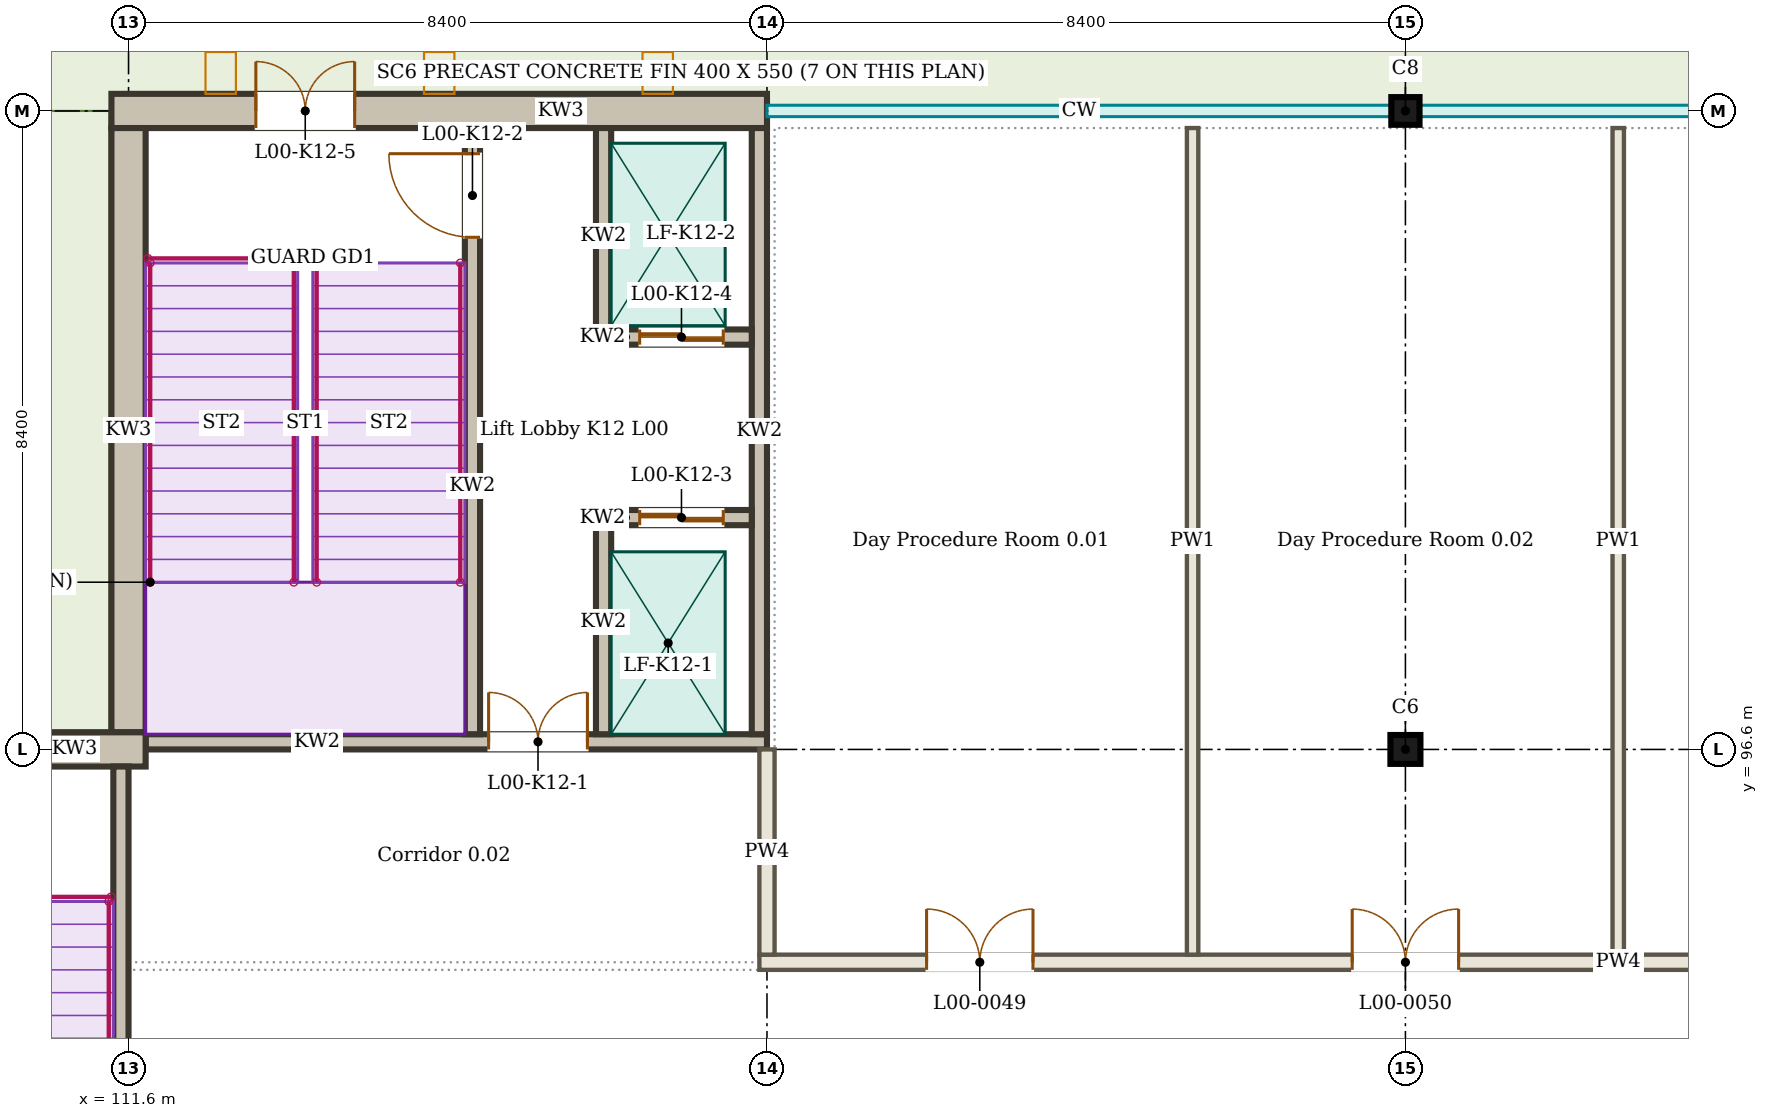
"""IFC4 building model, lengths in metres.
Left out: names, types, materials, properties, quantities, classifications, styles, units other than length and angle.
Written with IfcOpenShell. Run it as: python <this file> out.ifc"""

import sys

from ifc_helpers import new_model, si_unit, direction, frame, frame_2d, origin, origin_2d, place, context, subcontext, project, spatial, rectangle, i_section, extrude, element, fill, save


model = new_model("IFC4")
c1 = context("Model", 3, precision=1e-05, world=origin(), true_north=direction((0.0, 1.0)))
c2 = subcontext(c1, "Body", "Model", "MODEL_VIEW")
j1 = project(units=[si_unit("LENGTHUNIT", "METRE"), si_unit("PLANEANGLEUNIT", "RADIAN")], contexts=[c1])
p1 = place(None, origin())
s1 = spatial("IfcSite", under=j1, at=p1, CompositionType="ELEMENT")
p2 = place(p1, origin())
s2 = spatial("IfcBuilding", under=s1, at=p2, CompositionType="ELEMENT")
p3 = place(p2, origin())
s3 = spatial("IfcBuildingStorey", under=s2, at=p3, CompositionType="ELEMENT", Elevation=0.0)
p4 = place(p3, frame((128.4, 96.6, 0.0), z_axis=(0.0, 0.0, 1.0), x_axis=(1.0, 0.0, 0.0)))
e1 = element("IfcColumn", 1, at=p4, inside=s3, PredefinedType="COLUMN", context=c2, shape_type="SweptSolid", body=[
    extrude(i_section(OverallWidth=0.395, OverallDepth=0.38, WebThickness=0.019, FlangeThickness=0.03, FilletRadius=0.027, at=origin_2d()), origin(), (0.0, 0.0, 1.0), 4.5),
])
p5 = place(p3, frame((128.4, 105.0, 0.0), z_axis=(0.0, 0.0, 1.0), x_axis=(1.0, 0.0, 0.0)))
e2 = element("IfcColumn", 2, at=p5, inside=s3, PredefinedType="COLUMN", context=c2, shape_type="SweptSolid", body=[
    extrude(i_section(OverallWidth=0.371, OverallDepth=0.364, WebThickness=0.013, FlangeThickness=0.022, FilletRadius=0.027, at=origin_2d()), origin(), (0.0, 0.0, 1.0), 4.5),
])
p6 = place(p3, frame((119.9, 93.8, 0.0), z_axis=(0.0, 0.0, 1.0), x_axis=(1.0, 0.0, 0.0)))
e3 = element("IfcWall", 3, at=p6, inside=s3, PredefinedType="PARTITIONING", context=c2, shape_type="SweptSolid", body=[
    extrude(rectangle(XDim=22.6, YDim=0.2, at=frame_2d((11.3, 0.0))), origin(), (0.0, 0.0, 1.0), 3.8),
])
p7 = place(p6, frame((2.2, 0.0, 0.0)))
e4 = element("IfcOpeningElement", 4, at=p7, cuts=e3, PredefinedType="OPENING", context=c2, shape_type="SweptSolid", body=[
    extrude(rectangle(XDim=1.4, YDim=2.1, at=frame_2d((0.7, 1.05))), frame((0.0, 0.11, 0.0), z_axis=(0.0, -1.0, 0.0), x_axis=(1.0, 0.0, 0.0)), (0.0, 0.0, 1.0), 0.22),
])
p8 = place(p6, frame((7.8, 0.0, 0.0)))
e5 = element("IfcOpeningElement", 5, at=p8, cuts=e3, PredefinedType="OPENING", context=c2, shape_type="SweptSolid", body=[
    extrude(rectangle(XDim=1.4, YDim=2.1, at=frame_2d((0.7, 1.05))), frame((0.0, 0.11, 0.0), z_axis=(0.0, -1.0, 0.0), x_axis=(1.0, 0.0, 0.0)), (0.0, 0.0, 1.0), 0.22),
])
p9 = place(p6, frame((13.4, 0.0, 0.0)))
e6 = element("IfcOpeningElement", 6, at=p9, cuts=e3, PredefinedType="OPENING", context=c2, shape_type="SweptSolid", body=[
    extrude(rectangle(XDim=1.4, YDim=2.1, at=frame_2d((0.7, 1.05))), frame((0.0, 0.11, 0.0), z_axis=(0.0, -1.0, 0.0), x_axis=(1.0, 0.0, 0.0)), (0.0, 0.0, 1.0), 0.22),
])
p10 = place(p6, frame((19.0, 0.0, 0.0)))
e7 = element("IfcOpeningElement", 7, at=p10, cuts=e3, PredefinedType="OPENING", context=c2, shape_type="SweptSolid", body=[
    extrude(rectangle(XDim=1.4, YDim=2.1, at=frame_2d((0.7, 1.05))), frame((0.0, 0.11, 0.0), z_axis=(0.0, -1.0, 0.0), x_axis=(1.0, 0.0, 0.0)), (0.0, 0.0, 1.0), 0.22),
])
p11 = place(p3, frame((120.0, 93.9, 0.0), z_axis=(0.0, 0.0, 1.0), x_axis=(0.0, 1.0, 0.0)))
e8 = element("IfcWall", 8, at=p11, inside=s3, PredefinedType="PARTITIONING", context=c2, shape_type="SweptSolid", body=[
    extrude(rectangle(XDim=2.7, YDim=0.2, at=frame_2d((1.35, 0.0))), origin(), (0.0, 0.0, 1.0), 3.8),
])
for number, where, z_axis, x_axis in (
    (9, (125.6, 93.9, 0.0), (0.0, 0.0, 1.0), (0.0, 1.0, 0.0)),
    (10, (131.2, 93.9, 0.0), (0.0, 0.0, 1.0), (0.0, 1.0, 0.0)),
):
    element("IfcWall", number, at=place(p3, frame(where, z_axis=z_axis, x_axis=x_axis)), inside=s3, PredefinedType="PARTITIONING", context=c2, shape_type="SweptSolid", body=[
        extrude(rectangle(XDim=10.875, YDim=0.15, at=frame_2d((5.438, 0.0))), origin(), (0.0, 0.0, 1.0), 3.8),
    ])
p12 = place(p3, frame((111.825, 96.6, 0.0), z_axis=(0.0, 0.0, 1.0), x_axis=(-1.0, 0.0, 0.0)))
e11 = element("IfcWall", 11, at=p12, inside=s3, PredefinedType="SOLIDWALL", context=c2, shape_type="SweptSolid", body=[
    extrude(rectangle(XDim=8.625, YDim=0.45, at=frame_2d((4.312, 0.0))), origin(), (0.0, 0.0, 1.0), 4.5),
])
p13 = place(p12, frame((1.875, 0.0, 0.0)))
e12 = element("IfcOpeningElement", 12, at=p13, cuts=e11, PredefinedType="OPENING", context=c2, shape_type="SweptSolid", body=[
    extrude(rectangle(XDim=1.3, YDim=2.1, at=frame_2d((0.65, 1.05))), frame((0.0, 0.235, 0.0), z_axis=(0.0, -1.0, 0.0), x_axis=(1.0, 0.0, 0.0)), (0.0, 0.0, 1.0), 0.47),
])
p14 = place(p3, frame((111.5, 88.4, 0.0), z_axis=(0.0, 0.0, 1.0), x_axis=(0.0, 1.0, 0.0)))
e13 = element("IfcWall", 13, at=p14, inside=s3, PredefinedType="SOLIDWALL", context=c2, shape_type="SweptSolid", body=[
    extrude(rectangle(XDim=7.975, YDim=0.2, at=frame_2d((3.988, 0.0))), origin(), (0.0, 0.0, 1.0), 4.5),
])
p15 = place(p3, frame((111.825, 96.7, 0.0), z_axis=(0.0, 0.0, 1.0), x_axis=(1.0, 0.0, 0.0)))
e14 = element("IfcWall", 14, at=p15, inside=s3, PredefinedType="SOLIDWALL", context=c2, shape_type="SweptSolid", body=[
    extrude(rectangle(XDim=8.175, YDim=0.2, at=frame_2d((4.087, 0.0))), origin(), (0.0, 0.0, 1.0), 4.5),
])
p16 = place(p15, frame((4.512, 0.0, 0.0)))
e15 = element("IfcOpeningElement", 15, at=p16, cuts=e14, PredefinedType="OPENING", context=c2, shape_type="SweptSolid", body=[
    extrude(rectangle(XDim=1.3, YDim=2.1, at=frame_2d((0.65, 1.05))), frame((0.0, 0.11, 0.0), z_axis=(0.0, -1.0, 0.0), x_axis=(1.0, 0.0, 0.0)), (0.0, 0.0, 1.0), 0.22),
])
p17 = place(p3, frame((111.375, 105.0, 0.0), z_axis=(0.0, 0.0, 1.0), x_axis=(1.0, 0.0, 0.0)))
e16 = element("IfcWall", 16, at=p17, inside=s3, PredefinedType="SOLIDWALL", context=c2, shape_type="SweptSolid", body=[
    extrude(rectangle(XDim=8.625, YDim=0.45, at=frame_2d((4.312, 0.0))), origin(), (0.0, 0.0, 1.0), 4.5),
])
p18 = place(p17, frame((1.9, 0.0, 0.0)))
e17 = element("IfcOpeningElement", 17, at=p18, cuts=e16, PredefinedType="OPENING", context=c2, shape_type="SweptSolid", body=[
    extrude(rectangle(XDim=1.3, YDim=2.1, at=frame_2d((0.65, 1.05))), frame((0.0, 0.235, 0.0), z_axis=(0.0, -1.0, 0.0), x_axis=(1.0, 0.0, 0.0)), (0.0, 0.0, 1.0), 0.47),
])
p19 = place(p3, frame((111.6, 96.825, 0.0), z_axis=(0.0, 0.0, 1.0), x_axis=(0.0, 1.0, 0.0)))
e18 = element("IfcWall", 18, at=p19, inside=s3, PredefinedType="SOLIDWALL", context=c2, shape_type="SweptSolid", body=[
    extrude(rectangle(XDim=7.95, YDim=0.45, at=frame_2d((3.975, 0.0))), origin(), (0.0, 0.0, 1.0), 4.5),
])
p20 = place(p3, frame((119.9, 96.8, 0.0), z_axis=(0.0, 0.0, 1.0), x_axis=(0.0, 1.0, 0.0)))
e19 = element("IfcWall", 19, at=p20, inside=s3, PredefinedType="SOLIDWALL", context=c2, shape_type="SweptSolid", body=[
    extrude(rectangle(XDim=7.975, YDim=0.2, at=frame_2d((3.987, 0.0))), origin(), (0.0, 0.0, 1.0), 4.5),
])
p21 = place(p3, frame((116.125, 96.8, 0.0), z_axis=(0.0, 0.0, 1.0), x_axis=(0.0, 1.0, 0.0)))
e20 = element("IfcWall", 20, at=p21, inside=s3, PredefinedType="SOLIDWALL", context=c2, shape_type="SweptSolid", body=[
    extrude(rectangle(XDim=7.975, YDim=0.2, at=frame_2d((3.987, 0.0))), origin(), (0.0, 0.0, 1.0), 4.5),
])
p22 = place(p21, frame((6.538, 0.0, 0.0)))
e21 = element("IfcOpeningElement", 21, at=p22, cuts=e20, PredefinedType="OPENING", context=c2, shape_type="SweptSolid", body=[
    extrude(rectangle(XDim=1.1, YDim=2.1, at=frame_2d((0.55, 1.05))), frame((0.0, 0.11, 0.0), z_axis=(0.0, -1.0, 0.0), x_axis=(1.0, 0.0, 0.0)), (0.0, 0.0, 1.0), 0.22),
])
p23 = place(p3, frame((117.85, 96.8, 0.0), z_axis=(0.0, 0.0, 1.0), x_axis=(0.0, 1.0, 0.0)))
e22 = element("IfcWall", 22, at=p23, inside=s3, PredefinedType="SOLIDWALL", context=c2, shape_type="SweptSolid", body=[
    extrude(rectangle(XDim=2.95, YDim=0.2, at=frame_2d((1.475, 0.0))), origin(), (0.0, 0.0, 1.0), 4.5),
])
p24 = place(p3, frame((117.85, 101.925, 0.0), z_axis=(0.0, 0.0, 1.0), x_axis=(0.0, 1.0, 0.0)))
e23 = element("IfcWall", 23, at=p24, inside=s3, PredefinedType="SOLIDWALL", context=c2, shape_type="SweptSolid", body=[
    extrude(rectangle(XDim=2.85, YDim=0.2, at=frame_2d((1.425, 0.0))), origin(), (0.0, 0.0, 1.0), 4.5),
])
p25 = place(p3, frame((117.95, 99.65, 0.0), z_axis=(0.0, 0.0, 1.0), x_axis=(1.0, 0.0, 0.0)))
e24 = element("IfcWall", 24, at=p25, inside=s3, PredefinedType="SOLIDWALL", context=c2, shape_type="SweptSolid", body=[
    extrude(rectangle(XDim=1.85, YDim=0.2, at=frame_2d((0.925, 0.0))), origin(), (0.0, 0.0, 1.0), 4.5),
])
p26 = place(p25, frame((0.375, 0.0, 0.0)))
e25 = element("IfcOpeningElement", 25, at=p26, cuts=e24, PredefinedType="OPENING", context=c2, shape_type="SweptSolid", body=[
    extrude(rectangle(XDim=1.1, YDim=2.1, at=frame_2d((0.55, 1.05))), frame((0.0, 0.11, 0.0), z_axis=(0.0, -1.0, 0.0), x_axis=(1.0, 0.0, 0.0)), (0.0, 0.0, 1.0), 0.22),
])
p27 = place(p3, frame((117.95, 102.025, 0.0), z_axis=(0.0, 0.0, 1.0), x_axis=(1.0, 0.0, 0.0)))
e26 = element("IfcWall", 26, at=p27, inside=s3, PredefinedType="SOLIDWALL", context=c2, shape_type="SweptSolid", body=[
    extrude(rectangle(XDim=1.85, YDim=0.2, at=frame_2d((0.925, 0.0))), origin(), (0.0, 0.0, 1.0), 4.5),
])
p28 = place(p27, frame((0.375, 0.0, 0.0)))
e27 = element("IfcOpeningElement", 27, at=p28, cuts=e26, PredefinedType="OPENING", context=c2, shape_type="SweptSolid", body=[
    extrude(rectangle(XDim=1.1, YDim=2.1, at=frame_2d((0.55, 1.05))), frame((0.0, 0.11, 0.0), z_axis=(0.0, -1.0, 0.0), x_axis=(1.0, 0.0, 0.0)), (0.0, 0.0, 1.0), 0.22),
])
p29 = place(p7, origin())
e28 = element("IfcDoor", 28, at=p29, inside=s3, OperationType="DOUBLE_DOOR_SINGLE_SWING", PredefinedType="DOOR", context=c2, shape_type="SweptSolid", body=[
    extrude(rectangle(XDim=1.4, YDim=2.1, at=frame_2d((0.7, 1.05))), frame((0.0, 0.025, 0.0), z_axis=(0.0, -1.0, 0.0), x_axis=(1.0, 0.0, 0.0)), (0.0, 0.0, 1.0), 0.05),
])
fill(e4, e28)
p30 = place(p8, origin())
e29 = element("IfcDoor", 29, at=p30, inside=s3, OperationType="DOUBLE_DOOR_SINGLE_SWING", PredefinedType="DOOR", context=c2, shape_type="SweptSolid", body=[
    extrude(rectangle(XDim=1.4, YDim=2.1, at=frame_2d((0.7, 1.05))), frame((0.0, 0.025, 0.0), z_axis=(0.0, -1.0, 0.0), x_axis=(1.0, 0.0, 0.0)), (0.0, 0.0, 1.0), 0.05),
])
fill(e5, e29)
p31 = place(p16, origin())
e30 = element("IfcDoor", 30, at=p31, inside=s3, OperationType="DOUBLE_DOOR_DOUBLE_SWING", PredefinedType="DOOR", context=c2, shape_type="SweptSolid", body=[
    extrude(rectangle(XDim=1.3, YDim=2.1, at=frame_2d((0.65, 1.05))), frame((0.0, 0.025, 0.0), z_axis=(0.0, -1.0, 0.0), x_axis=(1.0, 0.0, 0.0)), (0.0, 0.0, 1.0), 0.05),
])
fill(e15, e30)
p32 = place(p22, origin())
e31 = element("IfcDoor", 31, at=p32, inside=s3, OperationType="SINGLE_SWING_RIGHT", PredefinedType="DOOR", context=c2, shape_type="SweptSolid", body=[
    extrude(rectangle(XDim=1.1, YDim=2.1, at=frame_2d((0.55, 1.05))), frame((0.0, 0.025, 0.0), z_axis=(0.0, -1.0, 0.0), x_axis=(1.0, 0.0, 0.0)), (0.0, 0.0, 1.0), 0.05),
])
fill(e21, e31)
p33 = place(p26, origin())
e32 = element("IfcDoor", 32, at=p33, inside=s3, OperationType="DOUBLE_DOOR_SLIDING", PredefinedType="DOOR", context=c2, shape_type="SweptSolid", body=[
    extrude(rectangle(XDim=1.1, YDim=2.1, at=frame_2d((0.55, 1.05))), frame((0.0, 0.025, 0.0), z_axis=(0.0, -1.0, 0.0), x_axis=(1.0, 0.0, 0.0)), (0.0, 0.0, 1.0), 0.05),
])
fill(e25, e32)
p34 = place(p28, origin())
e33 = element("IfcDoor", 33, at=p34, inside=s3, OperationType="DOUBLE_DOOR_SLIDING", PredefinedType="DOOR", context=c2, shape_type="SweptSolid", body=[
    extrude(rectangle(XDim=1.1, YDim=2.1, at=frame_2d((0.55, 1.05))), frame((0.0, 0.025, 0.0), z_axis=(0.0, -1.0, 0.0), x_axis=(1.0, 0.0, 0.0)), (0.0, 0.0, 1.0), 0.05),
])
fill(e27, e33)
p35 = place(p18, origin())
e34 = element("IfcDoor", 34, at=p35, inside=s3, OperationType="DOUBLE_DOOR_DOUBLE_SWING", PredefinedType="DOOR", context=c2, shape_type="SweptSolid", body=[
    extrude(rectangle(XDim=1.3, YDim=2.1, at=frame_2d((0.65, 1.05))), frame((0.0, 0.025, 0.0), z_axis=(0.0, -1.0, 0.0), x_axis=(1.0, 0.0, 0.0)), (0.0, 0.0, 1.0), 0.05),
])
fill(e17, e34)
save(model, sys.argv[1])
